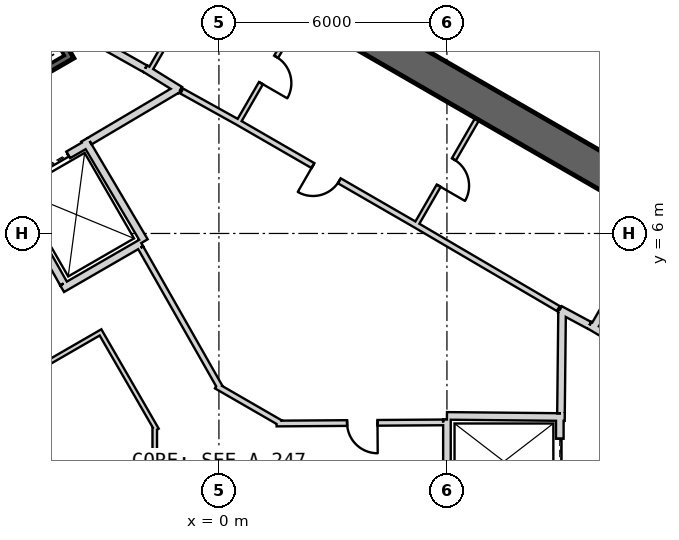
"""IFC4 building model, lengths in metres.
Left out: names, types, materials, properties, quantities, classifications, styles, units other than length and angle.
Written with IfcOpenShell. Run it as: python <this file> out.ifc"""

import sys

from ifc_helpers import new_model, si_unit, direction, frame, frame_2d, origin, place, context, subcontext, project, spatial, rectangle, extrude, element, fill, save


model = new_model("IFC4")
c1 = context("Model", 3, precision=1e-05, world=origin(), true_north=direction((0.0, 1.0)))
c2 = subcontext(c1, "Body", "Model", "MODEL_VIEW")
j1 = project(units=[si_unit("LENGTHUNIT", "METRE"), si_unit("PLANEANGLEUNIT", "RADIAN")], contexts=[c1])
p1 = place(None, origin())
s1 = spatial("IfcSite", under=j1, at=p1, CompositionType="ELEMENT")
p2 = place(p1, origin())
s2 = spatial("IfcBuilding", under=s1, at=p2, CompositionType="ELEMENT")
p3 = place(p2, frame((0.0, 0.0, 392.3)))
s3 = spatial("IfcBuildingStorey", under=s2, at=p3, CompositionType="ELEMENT", Elevation=392.3)
p4 = place(p3, frame((19.475, 2.208, 0.0), z_axis=(0.0, 0.0, 1.0), x_axis=(-0.866028369851, 0.499994862586, 0.0)))
e1 = element("IfcWall", 1, at=p4, inside=s3, PredefinedType="SHEAR", context=c2, shape_type="SweptSolid", body=[
    extrude(rectangle(XDim=31.523, YDim=0.9, at=frame_2d((15.762, 0.0))), origin(), (0.0, 0.0, 1.0), 6.0),
])
p5 = place(p4, frame((7.062, 0.0, 0.0)))
e2 = element("IfcOpeningElement", 2, at=p5, cuts=e1, PredefinedType="OPENING", context=c2, shape_type="SweptSolid", body=[
    extrude(rectangle(XDim=1.2, YDim=2.4, at=frame_2d((0.6, 1.2))), frame((0.0, 0.46, 0.0), z_axis=(0.0, -1.0, 0.0), x_axis=(1.0, 0.0, 0.0)), (0.0, 0.0, 1.0), 0.92),
])
p6 = place(p4, frame((3.612, 0.0, 0.0)))
e3 = element("IfcOpeningElement", 3, at=p6, cuts=e1, PredefinedType="OPENING", context=c2, shape_type="SweptSolid", body=[
    extrude(rectangle(XDim=1.2, YDim=2.4, at=frame_2d((0.6, 1.2))), frame((0.0, 0.46, 0.0), z_axis=(0.0, -1.0, 0.0), x_axis=(1.0, 0.0, 0.0)), (0.0, 0.0, 1.0), 0.92),
])
p7 = place(p4, frame((26.712, 0.0, 0.0)))
e4 = element("IfcOpeningElement", 4, at=p7, cuts=e1, PredefinedType="OPENING", context=c2, shape_type="SweptSolid", body=[
    extrude(rectangle(XDim=1.2, YDim=2.4, at=frame_2d((0.6, 1.2))), frame((0.0, 0.46, 0.0), z_axis=(0.0, -1.0, 0.0), x_axis=(1.0, 0.0, 0.0)), (0.0, 0.0, 1.0), 0.92),
])
p8 = place(p3, frame((9.847, 3.495, 0.0), z_axis=(0.0, 0.0, 1.0), x_axis=(0.499984717929, 0.866034226713, 0.0)))
e5 = element("IfcWall", 5, at=p8, inside=s3, PredefinedType="PLUMBINGWALL", context=c2, shape_type="SweptSolid", body=[
    extrude(rectangle(XDim=3.25, YDim=0.2, at=frame_2d((1.625, 0.0))), origin(), (0.0, 0.0, 1.0), 5.7),
])
p9 = place(p3, frame((12.073, 2.211, 0.0), z_axis=(0.0, 0.0, 1.0), x_axis=(-0.860414880418, 0.509594185166, 0.0)))
e6 = element("IfcWall", 6, at=p9, inside=s3, PredefinedType="PLUMBINGWALL", context=c2, shape_type="SweptSolid", body=[
    extrude(rectangle(XDim=2.7, YDim=0.2, at=frame_2d((1.35, 0.0))), origin(), (0.0, 0.0, 1.0), 5.7),
])
p10 = place(p3, frame((8.97, 1.2, 0.0), z_axis=(0.0, 0.0, 1.0), x_axis=(0.0, -1.0, 0.0)))
e7 = element("IfcWall", 7, at=p10, inside=s3, PredefinedType="PLUMBINGWALL", context=c2, shape_type="SweptSolid", body=[
    extrude(rectangle(XDim=2.4, YDim=0.2, at=frame_2d((1.2, 0.0))), origin(), (0.0, 0.0, 1.0), 5.7),
])
p11 = place(p10, frame((0.6, 0.0, 0.0)))
e8 = element("IfcOpeningElement", 8, at=p11, cuts=e7, PredefinedType="OPENING", context=c2, shape_type="SweptSolid", body=[
    extrude(rectangle(XDim=1.2, YDim=2.4, at=frame_2d((0.6, 1.2))), frame((0.0, 0.11, 0.0), z_axis=(0.0, -1.0, 0.0), x_axis=(1.0, 0.0, 0.0)), (0.0, 0.0, 1.0), 0.22),
])
p12 = place(p3, frame((6.0, 1.2, 0.0), z_axis=(0.0, 0.0, 1.0), x_axis=(0.999949988, -0.010001074852, 0.0)))
e9 = element("IfcWall", 9, at=p12, inside=s3, PredefinedType="PLUMBINGWALL", context=c2, shape_type="SweptSolid", body=[
    extrude(rectangle(XDim=3.1, YDim=0.2, at=frame_2d((1.55, 0.0))), origin(), (0.0, 0.0, 1.0), 5.7),
])
p13 = place(p3, frame((6.0, -1.1, 0.0), z_axis=(0.0, 0.0, 1.0), x_axis=(0.0, 1.0, 0.0)))
e10 = element("IfcWall", 10, at=p13, inside=s3, PredefinedType="PLUMBINGWALL", context=c2, shape_type="SweptSolid", body=[
    extrude(rectangle(XDim=2.205, YDim=0.2, at=frame_2d((1.102, 0.0))), origin(), (0.0, 0.0, 1.0), 5.7),
])
p14 = place(p3, frame((-7.854, 17.405, -0.35), z_axis=(0.0, 0.0, 1.0), x_axis=(0.499997992926, -0.866026562566, 0.0)))
e11 = element("IfcWall", 11, at=p14, inside=s3, PredefinedType="SHEAR", context=c2, shape_type="SweptSolid", body=[
    extrude(rectangle(XDim=7.9, YDim=0.2, at=frame_2d((3.95, 0.0))), origin(), (0.0, 0.0, 1.0), 6.05),
])
p15 = place(p3, frame((-7.159, 8.8, -0.35), z_axis=(0.0, 0.0, 1.0), x_axis=(0.866047807691, 0.499961193289, 0.0)))
e12 = element("IfcWall", 12, at=p15, inside=s3, PredefinedType="SHEAR", context=c2, shape_type="SweptSolid", body=[
    extrude(rectangle(XDim=3.6, YDim=0.2, at=frame_2d((1.8, 0.0))), origin(), (0.0, 0.0, 1.0), 6.05),
])
p16 = place(p15, frame((1.25, 0.0, 0.35)))
e13 = element("IfcOpeningElement", 13, at=p16, cuts=e12, PredefinedType="OPENING", context=c2, shape_type="SweptSolid", body=[
    extrude(rectangle(XDim=1.1, YDim=2.1, at=frame_2d((0.55, 1.05))), frame((0.0, 0.11, 0.0), z_axis=(0.0, -1.0, 0.0), x_axis=(1.0, 0.0, 0.0)), (0.0, 0.0, 1.0), 0.22),
])
p17 = place(p3, frame((-5.524, 7.168, 0.0), z_axis=(0.0, 0.0, 1.0), x_axis=(0.866024647952, 0.500001309137, 0.0)))
e14 = element("IfcWall", 14, at=p17, inside=s3, PredefinedType="PLUMBINGWALL", context=c2, shape_type="SweptSolid", body=[
    extrude(rectangle(XDim=2.4, YDim=0.2, at=frame_2d((1.2, 0.0))), origin(), (0.0, 0.0, 1.0), 5.7),
])
p18 = place(p17, frame((0.6, 0.0, 0.0)))
e15 = element("IfcOpeningElement", 15, at=p18, cuts=e14, PredefinedType="OPENING", context=c2, shape_type="SweptSolid", body=[
    extrude(rectangle(XDim=1.2, YDim=2.4, at=frame_2d((0.6, 1.2))), frame((0.0, 0.11, 0.0), z_axis=(0.0, -1.0, 0.0), x_axis=(1.0, 0.0, 0.0)), (0.0, 0.0, 1.0), 0.22),
])
p19 = place(p3, frame((-3.538, 8.465, 0.0), z_axis=(0.0, 0.0, 1.0), x_axis=(0.508647062354, -0.860975125052, 0.0)))
e16 = element("IfcWall", 16, at=p19, inside=s3, PredefinedType="PLUMBINGWALL", context=c2, shape_type="SweptSolid", body=[
    extrude(rectangle(XDim=3.1, YDim=0.2, at=frame_2d((1.55, 0.0))), origin(), (0.0, 0.0, 1.0), 5.7),
])
p20 = place(p3, frame((-2.043, 5.748, 0.0), z_axis=(0.0, 0.0, 1.0), x_axis=(-0.866035096217, -0.499983211839, 0.0)))
e17 = element("IfcWall", 17, at=p20, inside=s3, PredefinedType="PLUMBINGWALL", context=c2, shape_type="SweptSolid", body=[
    extrude(rectangle(XDim=2.404, YDim=0.2, at=frame_2d((1.202, 0.0))), origin(), (0.0, 0.0, 1.0), 5.7),
])
p21 = place(p3, frame((-5.562, 7.296, 0.0), z_axis=(0.0, 0.0, 1.0), x_axis=(0.49134651263, -0.870964180966, 0.0)))
e18 = element("IfcWall", 18, at=p21, inside=s3, PredefinedType="PLUMBINGWALL", context=c2, shape_type="SweptSolid", body=[
    extrude(rectangle(XDim=3.0, YDim=0.2, at=frame_2d((1.5, 0.0))), origin(), (0.0, 0.0, 1.0), 5.7),
])
p22 = place(p3, frame((6.795, 9.01, 0.0), z_axis=(0.0, 0.0, 1.0), x_axis=(-0.499984717929, -0.866034226713, 0.0)))
e19 = element("IfcWall", 19, at=p22, inside=s3, PredefinedType="PARTITIONING", context=c2, shape_type="SweptSolid", body=[
    extrude(rectangle(XDim=3.25, YDim=0.12, at=frame_2d((1.625, 0.0))), origin(), (0.0, 0.0, 1.0), 5.7),
])
p23 = place(p22, frame((1.225, 0.0, 0.0)))
e20 = element("IfcOpeningElement", 20, at=p23, cuts=e19, PredefinedType="OPENING", context=c2, shape_type="SweptSolid", body=[
    extrude(rectangle(XDim=0.8, YDim=2.1, at=frame_2d((0.4, 1.05))), frame((0.0, 0.07, 0.0), z_axis=(0.0, -1.0, 0.0), x_axis=(1.0, 0.0, 0.0)), (0.0, 0.0, 1.0), 0.14),
])
p24 = place(p3, frame((8.974, 3.999, 0.0), z_axis=(0.0, 0.0, 1.0), x_axis=(0.880917147855, -0.473270513147, 0.0)))
e21 = element("IfcWall", 21, at=p24, inside=s3, PredefinedType="PARTITIONING", context=c2, shape_type="SweptSolid", body=[
    extrude(rectangle(XDim=0.878, YDim=0.2, at=frame_2d((0.439, 0.0))), origin(), (0.0, 0.0, 1.0), 5.7),
])
p25 = place(p3, frame((8.931, 4.025, 0.0), z_axis=(0.0, 0.0, 1.0), x_axis=(-0.862666884027, 0.505772525157, 0.0)))
e22 = element("IfcWall", 22, at=p25, inside=s3, PredefinedType="PLUMBINGWALL", context=c2, shape_type="SweptSolid", body=[
    extrude(rectangle(XDim=4.372, YDim=0.15, at=frame_2d((2.186, 0.0))), origin(), (0.0, 0.0, 1.0), 5.7),
])
p26 = place(p3, frame((2.119, 11.709, 0.0), z_axis=(0.0, 0.0, 1.0), x_axis=(-0.500017246033, -0.866015446554, 0.0)))
e23 = element("IfcWall", 23, at=p26, inside=s3, PredefinedType="PARTITIONING", context=c2, shape_type="SweptSolid", body=[
    extrude(rectangle(XDim=3.25, YDim=0.12, at=frame_2d((1.625, 0.0))), origin(), (0.0, 0.0, 1.0), 5.7),
])
p27 = place(p26, frame((1.225, 0.0, 0.0)))
e24 = element("IfcOpeningElement", 24, at=p27, cuts=e23, PredefinedType="OPENING", context=c2, shape_type="SweptSolid", body=[
    extrude(rectangle(XDim=0.8, YDim=2.1, at=frame_2d((0.4, 1.05))), frame((0.0, 0.07, 0.0), z_axis=(0.0, -1.0, 0.0), x_axis=(1.0, 0.0, 0.0)), (0.0, 0.0, 1.0), 0.14),
])
p28 = place(p3, frame((5.159, 6.236, 0.0), z_axis=(0.0, 0.0, 1.0), x_axis=(-0.866028230842, 0.499995103361, 0.0)))
e25 = element("IfcWall", 25, at=p28, inside=s3, PredefinedType="PLUMBINGWALL", context=c2, shape_type="SweptSolid", body=[
    extrude(rectangle(XDim=5.4, YDim=0.15, at=frame_2d((2.7, 0.0))), origin(), (0.0, 0.0, 1.0), 5.7),
])
p29 = place(p28, frame((2.3, 0.0, 0.0)))
e26 = element("IfcOpeningElement", 26, at=p29, cuts=e25, PredefinedType="OPENING", context=c2, shape_type="SweptSolid", body=[
    extrude(rectangle(XDim=0.8, YDim=2.1, at=frame_2d((0.4, 1.05))), frame((0.0, 0.085, 0.0), z_axis=(0.0, -1.0, 0.0), x_axis=(1.0, 0.0, 0.0)), (0.0, 0.0, 1.0), 0.17),
])
p30 = place(p3, frame((-0.22, 13.06, 0.0), z_axis=(0.0, 0.0, 1.0), x_axis=(-0.499984717929, -0.866034226713, 0.0)))
e27 = element("IfcWall", 27, at=p30, inside=s3, PredefinedType="PARTITIONING", context=c2, shape_type="SweptSolid", body=[
    extrude(rectangle(XDim=3.25, YDim=0.12, at=frame_2d((1.625, 0.0))), origin(), (0.0, 0.0, 1.0), 5.7),
])
p31 = place(p30, frame((1.225, 0.0, 0.0)))
e28 = element("IfcOpeningElement", 28, at=p31, cuts=e27, PredefinedType="OPENING", context=c2, shape_type="SweptSolid", body=[
    extrude(rectangle(XDim=0.8, YDim=2.1, at=frame_2d((0.4, 1.05))), frame((0.0, 0.07, 0.0), z_axis=(0.0, -1.0, 0.0), x_axis=(1.0, 0.0, 0.0)), (0.0, 0.0, 1.0), 0.14),
])
p32 = place(p3, frame((-1.941, 10.339, 0.0), z_axis=(0.0, 0.0, 1.0), x_axis=(0.850216889117, -0.526432561171, 0.0)))
e29 = element("IfcWall", 29, at=p32, inside=s3, PredefinedType="PARTITIONING", context=c2, shape_type="SweptSolid", body=[
    extrude(rectangle(XDim=1.078, YDim=0.2, at=frame_2d((0.539, 0.0))), origin(), (0.0, 0.0, 1.0), 5.7),
])
p33 = place(p3, frame((0.483, 8.936, 0.0), z_axis=(0.0, 0.0, 1.0), x_axis=(-0.874315691004, 0.485357674776, 0.0)))
e30 = element("IfcWall", 30, at=p33, inside=s3, PredefinedType="PLUMBINGWALL", context=c2, shape_type="SweptSolid", body=[
    extrude(rectangle(XDim=1.671, YDim=0.15, at=frame_2d((0.836, 0.0))), origin(), (0.0, 0.0, 1.0), 5.7),
])
p34 = place(p3, frame((-4.296, 11.659, 0.0), z_axis=(0.0, 0.0, 1.0), x_axis=(0.871534483978, -0.490334215854, 0.0)))
e31 = element("IfcWall", 31, at=p34, inside=s3, PredefinedType="PARTITIONING", context=c2, shape_type="SweptSolid", body=[
    extrude(rectangle(XDim=2.7, YDim=0.2, at=frame_2d((1.35, 0.0))), origin(), (0.0, 0.0, 1.0), 5.7),
])
p35 = place(p3, frame((9.001, 1.27, 0.0), z_axis=(0.0, 0.0, 1.0), x_axis=(0.01074821465, 0.999942236273, 0.0)))
e32 = element("IfcWall", 32, at=p35, inside=s3, PredefinedType="PARTITIONING", context=c2, shape_type="SweptSolid", body=[
    extrude(rectangle(XDim=2.726, YDim=0.2, at=frame_2d((1.363, 0.0))), origin(), (0.0, 0.0, 1.0), 5.7),
])
p36 = place(p3, frame((-1.056, 9.818, 0.0), z_axis=(0.0, 0.0, 1.0), x_axis=(-0.860599924646, -0.509281621207, 0.0)))
e33 = element("IfcWall", 33, at=p36, inside=s3, PredefinedType="PARTITIONING", context=c2, shape_type="SweptSolid", body=[
    extrude(rectangle(XDim=2.725, YDim=0.2, at=frame_2d((1.362, 0.0))), origin(), (0.0, 0.0, 1.0), 5.7),
])
p37 = place(p3, frame((1.518, 0.999, 0.0), z_axis=(0.0, 0.0, 1.0), x_axis=(0.999976903524, 0.006796500403, 0.0)))
e34 = element("IfcWall", 34, at=p37, inside=s3, PredefinedType="PLUMBINGWALL", context=c2, shape_type="SweptSolid", body=[
    extrude(rectangle(XDim=4.382, YDim=0.15, at=frame_2d((2.191, 0.0))), origin(), (0.0, 0.0, 1.0), 5.7),
])
p38 = place(p37, frame((1.855, 0.0, 0.0)))
e35 = element("IfcOpeningElement", 35, at=p38, cuts=e34, PredefinedType="OPENING", context=c2, shape_type="SweptSolid", body=[
    extrude(rectangle(XDim=0.8, YDim=2.1, at=frame_2d((0.4, 1.05))), frame((0.0, 0.085, 0.0), z_axis=(0.0, -1.0, 0.0), x_axis=(1.0, 0.0, 0.0)), (0.0, 0.0, 1.0), 0.17),
])
p39 = place(p3, frame((-0.067, 1.989, 0.0), z_axis=(0.0, 0.0, 1.0), x_axis=(0.865981695925, -0.500075696594, 0.0)))
e36 = element("IfcWall", 36, at=p39, inside=s3, PredefinedType="PLUMBINGWALL", context=c2, shape_type="SweptSolid", body=[
    extrude(rectangle(XDim=1.954, YDim=0.15, at=frame_2d((0.977, 0.0))), origin(), (0.0, 0.0, 1.0), 5.7),
])
p40 = place(p3, frame((-2.059, 5.624, 0.0), z_axis=(0.0, 0.0, 1.0), x_axis=(0.494149180773, -0.869377125959, 0.0)))
e37 = element("IfcWall", 37, at=p40, inside=s3, PredefinedType="PLUMBINGWALL", context=c2, shape_type="SweptSolid", body=[
    extrude(rectangle(XDim=4.231, YDim=0.15, at=frame_2d((2.116, 0.0))), origin(), (0.0, 0.0, 1.0), 5.7),
])
p41 = place(p3, frame((-3.064, 3.427, 0.0), z_axis=(0.0, 0.0, 1.0), x_axis=(-0.866087547558, -0.499892348375, 0.0)))
e38 = element("IfcWall", 38, at=p41, inside=s3, PredefinedType="PARTITIONING", context=c2, shape_type="SweptSolid", body=[
    extrude(rectangle(XDim=1.7, YDim=0.12, at=frame_2d((0.85, 0.0))), origin(), (0.0, 0.0, 1.0), 5.7),
])
p42 = place(p3, frame((-1.637, 0.835, 0.0), z_axis=(0.0, 0.0, 1.0), x_axis=(-0.499980071345, 0.866036909293, 0.0)))
e39 = element("IfcWall", 39, at=p42, inside=s3, PredefinedType="PARTITIONING", context=c2, shape_type="SweptSolid", body=[
    extrude(rectangle(XDim=2.898, YDim=0.12, at=frame_2d((1.449, 0.0))), origin(), (0.0, 0.0, 1.0), 5.7),
])
p43 = place(p3, frame((-1.689, -1.029, 0.0), z_axis=(0.0, 0.0, 1.0), x_axis=(0.0, 1.0, 0.0)))
e40 = element("IfcWall", 40, at=p43, inside=s3, PredefinedType="PARTITIONING", context=c2, shape_type="SweptSolid", body=[
    extrude(rectangle(XDim=1.935, YDim=0.12, at=frame_2d((0.968, 0.0))), origin(), (0.0, 0.0, 1.0), 5.7),
])
p44 = place(p3, frame((22.792, 6.009, 0.0), z_axis=(0.0, 0.0, 1.0), x_axis=(-0.866028288731, 0.499995003092, 0.0)))
e41 = element("IfcWall", 41, at=p44, inside=s3, PredefinedType="PARTITIONING", context=c2, shape_type="SweptSolid", body=[
    extrude(rectangle(XDim=23.262, YDim=0.2, at=frame_2d((11.631, 0.0))), origin(), (0.0, 0.0, 1.0), 5.07),
])
p45 = place(p44, frame((11.1, 0.0, 0.0)))
e42 = element("IfcOpeningElement", 42, at=p45, cuts=e41, PredefinedType="OPENING", context=c2, shape_type="SweptSolid", body=[
    extrude(rectangle(XDim=1.0, YDim=2.1, at=frame_2d((0.5, 1.05))), frame((0.0, 0.11, 0.0), z_axis=(0.0, -1.0, 0.0), x_axis=(1.0, 0.0, 0.0)), (0.0, 0.0, 1.0), 0.22),
])
p46 = place(p11, origin())
e43 = element("IfcDoor", 43, at=p46, inside=s3, OperationType="SLIDING_TO_LEFT", PredefinedType="USERDEFINED", context=c2, shape_type="SweptSolid", body=[
    extrude(rectangle(XDim=1.2, YDim=2.4, at=frame_2d((0.6, 1.2))), frame((0.0, 0.025, 0.0), z_axis=(0.0, -1.0, 0.0), x_axis=(1.0, 0.0, 0.0)), (0.0, 0.0, 1.0), 0.05),
])
fill(e8, e43)
p47 = place(p18, origin())
e44 = element("IfcDoor", 44, at=p47, inside=s3, OperationType="SLIDING_TO_LEFT", PredefinedType="USERDEFINED", context=c2, shape_type="SweptSolid", body=[
    extrude(rectangle(XDim=1.2, YDim=2.4, at=frame_2d((0.6, 1.2))), frame((0.0, 0.025, 0.0), z_axis=(0.0, -1.0, 0.0), x_axis=(1.0, 0.0, 0.0)), (0.0, 0.0, 1.0), 0.05),
])
fill(e15, e44)
p48 = place(p38, origin())
e45 = element("IfcDoor", 45, at=p48, inside=s3, OperationType="SINGLE_SWING_RIGHT", PredefinedType="USERDEFINED", context=c2, shape_type="SweptSolid", body=[
    extrude(rectangle(XDim=0.8, YDim=2.1, at=frame_2d((0.4, 1.05))), frame((0.0, 0.025, 0.0), z_axis=(0.0, -1.0, 0.0), x_axis=(1.0, 0.0, 0.0)), (0.0, 0.0, 1.0), 0.05),
])
fill(e35, e45)
p49 = place(p23, origin())
e46 = element("IfcDoor", 46, at=p49, inside=s3, OperationType="SINGLE_SWING_RIGHT", PredefinedType="USERDEFINED", context=c2, shape_type="SweptSolid", body=[
    extrude(rectangle(XDim=0.8, YDim=2.1, at=frame_2d((0.4, 1.05))), frame((0.0, 0.025, 0.0), z_axis=(0.0, -1.0, 0.0), x_axis=(1.0, 0.0, 0.0)), (0.0, 0.0, 1.0), 0.05),
])
fill(e20, e46)
p50 = place(p27, origin())
e47 = element("IfcDoor", 47, at=p50, inside=s3, OperationType="SINGLE_SWING_RIGHT", PredefinedType="USERDEFINED", context=c2, shape_type="SweptSolid", body=[
    extrude(rectangle(XDim=0.8, YDim=2.1, at=frame_2d((0.4, 1.05))), frame((0.0, 0.025, 0.0), z_axis=(0.0, -1.0, 0.0), x_axis=(1.0, 0.0, 0.0)), (0.0, 0.0, 1.0), 0.05),
])
fill(e24, e47)
p51 = place(p29, origin())
e48 = element("IfcDoor", 48, at=p51, inside=s3, OperationType="SINGLE_SWING_RIGHT", PredefinedType="USERDEFINED", context=c2, shape_type="SweptSolid", body=[
    extrude(rectangle(XDim=0.8, YDim=2.1, at=frame_2d((0.4, 1.05))), frame((0.0, 0.025, 0.0), z_axis=(0.0, -1.0, 0.0), x_axis=(1.0, 0.0, 0.0)), (0.0, 0.0, 1.0), 0.05),
])
fill(e26, e48)
save(model, sys.argv[1])
